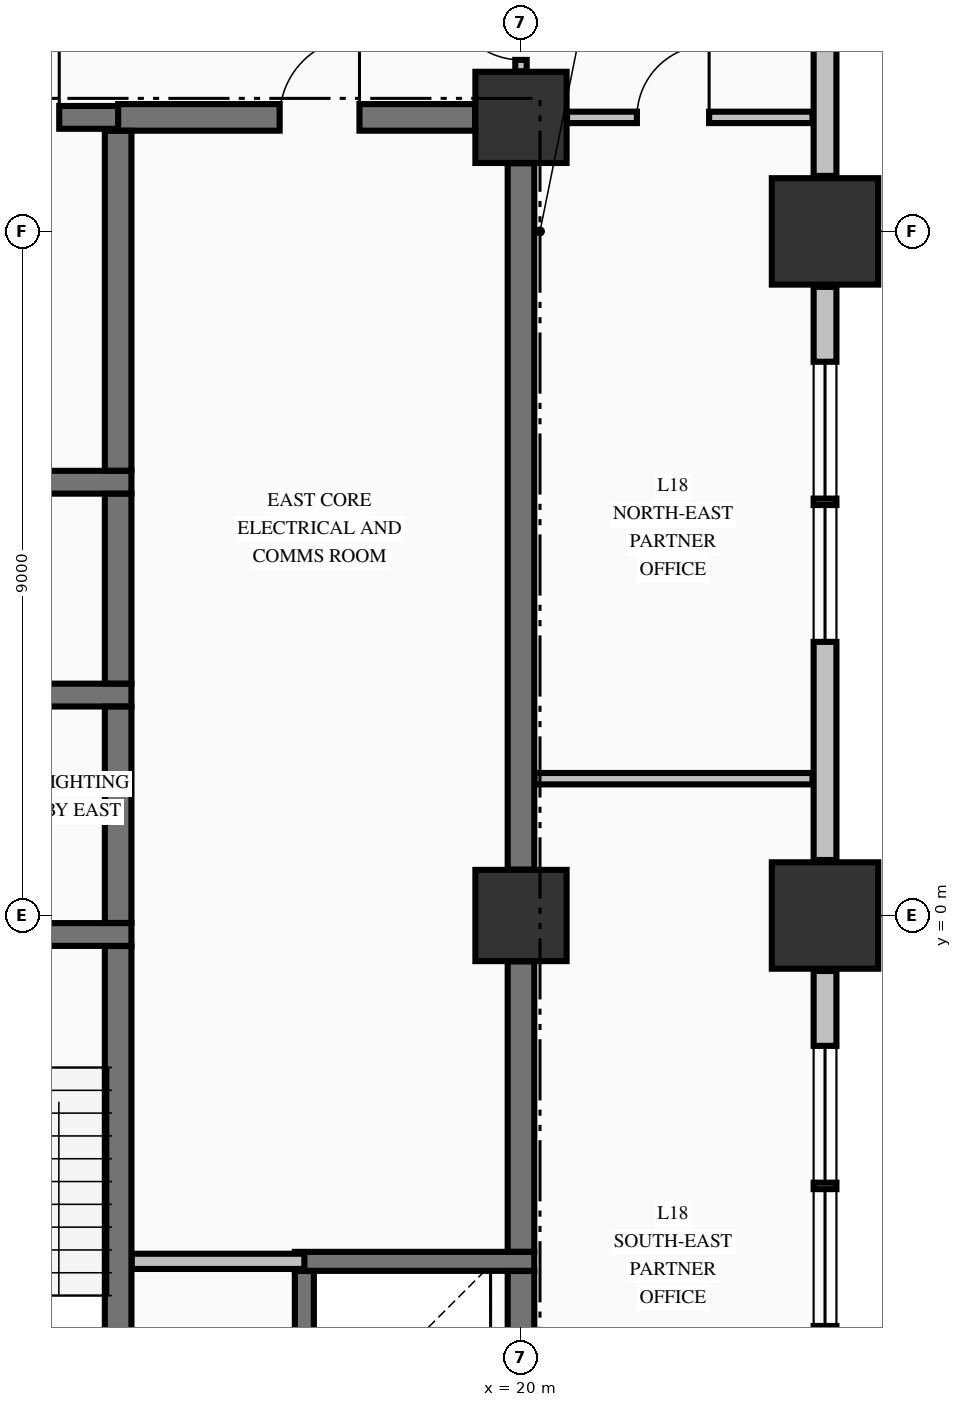
"""IFC4 building model, lengths in metres.
Left out: names, types, materials, properties, quantities, classifications, styles, units other than length and angle.
Written with IfcOpenShell. Run it as: python <this file> out.ifc"""

import sys

from ifc_helpers import new_model, si_unit, direction, frame, frame_2d, origin, origin_2d, place, context, subcontext, project, spatial, rectangle, extrude, element, fill, save


model = new_model("IFC4")
c1 = context("Model", 3, precision=1e-05, world=origin(), true_north=direction((0.0, 1.0)))
c2 = subcontext(c1, "Body", "Model", "MODEL_VIEW")
j1 = project(units=[si_unit("LENGTHUNIT", "METRE"), si_unit("PLANEANGLEUNIT", "RADIAN")], contexts=[c1])
p1 = place(None, origin())
s1 = spatial("IfcSite", under=j1, at=p1, CompositionType="ELEMENT")
p2 = place(p1, origin())
s2 = spatial("IfcBuilding", under=s1, at=p2, CompositionType="ELEMENT")
p3 = place(p2, frame((0.0, 0.0, 75.04)))
s3 = spatial("IfcBuildingStorey", under=s2, at=p3, CompositionType="ELEMENT", Elevation=75.04)
for number, where, z_axis, x_axis in (
    (1, (24.0, 0.0, -0.25), (0.0, 0.0, 1.0), (1.0, 0.0, 0.0)),
    (2, (24.0, 9.0, -0.25), (0.0, 0.0, 1.0), (1.0, 0.0, 0.0)),
):
    element("IfcColumn", number, at=place(p3, frame(where, z_axis=z_axis, x_axis=x_axis)), inside=s3, PredefinedType="COLUMN", context=c2, shape_type="SweptSolid", body=[
        extrude(rectangle(XDim=1.4, YDim=1.4, at=origin_2d()), origin(), (0.0, 0.0, 1.0), 3.57),
    ])
for number, where, z_axis, x_axis in (
    (3, (20.0, 10.5, -0.25), (0.0, 0.0, 1.0), (1.0, 0.0, 0.0)),
    (4, (20.0, 0.0, -0.25), (0.0, 0.0, 1.0), (1.0, 0.0, 0.0)),
):
    element("IfcColumn", number, at=place(p3, frame(where, z_axis=z_axis, x_axis=x_axis)), inside=s3, PredefinedType="COLUMN", context=c2, shape_type="SweptSolid", body=[
        extrude(rectangle(XDim=1.2, YDim=1.2, at=origin_2d()), origin(), (0.0, 0.0, 1.0), 3.57),
    ])
p4 = place(p3, frame((24.0, -8.27, 0.0), z_axis=(0.0, 0.0, 1.0), x_axis=(0.0, 1.0, 0.0)))
e5 = element("IfcWall", 5, at=p4, inside=s3, PredefinedType="STANDARD", context=c2, shape_type="SweptSolid", body=[
    extrude(rectangle(XDim=7.54, YDim=0.3, at=frame_2d((3.77, 0.0))), origin(), (0.0, 0.0, 1.0), 2.712),
])
p5 = place(p4, frame((0.985, 0.0, 0.78)))
e6 = element("IfcOpeningElement", 6, at=p5, cuts=e5, PredefinedType="OPENING", context=c2, shape_type="SweptSolid", body=[
    extrude(rectangle(XDim=1.8, YDim=1.72, at=frame_2d((0.9, 0.86))), frame((0.0, 0.16, 0.0), z_axis=(0.0, -1.0, 0.0), x_axis=(1.0, 0.0, 0.0)), (0.0, 0.0, 1.0), 0.32),
])
p6 = place(p4, frame((2.87, 0.0, 0.78)))
e7 = element("IfcOpeningElement", 7, at=p6, cuts=e5, PredefinedType="OPENING", context=c2, shape_type="SweptSolid", body=[
    extrude(rectangle(XDim=1.8, YDim=1.72, at=frame_2d((0.9, 0.86))), frame((0.0, 0.16, 0.0), z_axis=(0.0, -1.0, 0.0), x_axis=(1.0, 0.0, 0.0)), (0.0, 0.0, 1.0), 0.32),
])
p7 = place(p4, frame((4.755, 0.0, 0.78)))
e8 = element("IfcOpeningElement", 8, at=p7, cuts=e5, PredefinedType="OPENING", context=c2, shape_type="SweptSolid", body=[
    extrude(rectangle(XDim=1.8, YDim=1.72, at=frame_2d((0.9, 0.86))), frame((0.0, 0.16, 0.0), z_axis=(0.0, -1.0, 0.0), x_axis=(1.0, 0.0, 0.0)), (0.0, 0.0, 1.0), 0.32),
])
p8 = place(p3, frame((24.0, 0.73, 0.0), z_axis=(0.0, 0.0, 1.0), x_axis=(0.0, 1.0, 0.0)))
e9 = element("IfcWall", 9, at=p8, inside=s3, PredefinedType="STANDARD", context=c2, shape_type="SweptSolid", body=[
    extrude(rectangle(XDim=7.54, YDim=0.3, at=frame_2d((3.77, 0.0))), origin(), (0.0, 0.0, 1.0), 2.712),
])
p9 = place(p8, frame((2.87, 0.0, 0.78)))
e10 = element("IfcOpeningElement", 10, at=p9, cuts=e9, PredefinedType="OPENING", context=c2, shape_type="SweptSolid", body=[
    extrude(rectangle(XDim=1.8, YDim=1.72, at=frame_2d((0.9, 0.86))), frame((0.0, 0.16, 0.0), z_axis=(0.0, -1.0, 0.0), x_axis=(1.0, 0.0, 0.0)), (0.0, 0.0, 1.0), 0.32),
])
p10 = place(p8, frame((4.755, 0.0, 0.78)))
e11 = element("IfcOpeningElement", 11, at=p10, cuts=e9, PredefinedType="OPENING", context=c2, shape_type="SweptSolid", body=[
    extrude(rectangle(XDim=1.8, YDim=1.72, at=frame_2d((0.9, 0.86))), frame((0.0, 0.16, 0.0), z_axis=(0.0, -1.0, 0.0), x_axis=(1.0, 0.0, 0.0)), (0.0, 0.0, 1.0), 0.32),
])
p11 = place(p3, frame((24.0, 9.73, 0.0), z_axis=(0.0, 0.0, 1.0), x_axis=(0.0, 1.0, 0.0)))
e12 = element("IfcWall", 12, at=p11, inside=s3, PredefinedType="STANDARD", context=c2, shape_type="SweptSolid", body=[
    extrude(rectangle(XDim=12.54, YDim=0.3, at=frame_2d((6.27, 0.0))), origin(), (0.0, 0.0, 1.0), 2.712),
])
p12 = place(p3, frame((17.025, -4.55, 0.0), z_axis=(0.0, 0.0, 1.0), x_axis=(1.0, 0.0, 0.0)))
e13 = element("IfcWall", 13, at=p12, inside=s3, PredefinedType="SOLIDWALL", context=c2, shape_type="SweptSolid", body=[
    extrude(rectangle(XDim=3.15, YDim=0.25, at=frame_2d((1.575, 0.0))), origin(), (0.0, 0.0, 1.0), 3.32),
])
p13 = place(p3, frame((11.604, -0.25, 0.0), z_axis=(0.0, 0.0, 1.0), x_axis=(1.0, 0.0, 0.0)))
e14 = element("IfcWall", 14, at=p13, inside=s3, PredefinedType="SHEAR", context=c2, shape_type="SweptSolid", body=[
    extrude(rectangle(XDim=3.271, YDim=0.3, at=frame_2d((1.635, 0.0))), origin(), (0.0, 0.0, 1.0), 3.32),
])
p14 = place(p13, frame((0.996, 0.0, 0.0)))
e15 = element("IfcOpeningElement", 15, at=p14, cuts=e14, PredefinedType="OPENING", context=c2, shape_type="SweptSolid", body=[
    extrude(rectangle(XDim=1.1, YDim=2.15, at=frame_2d((0.55, 1.075))), frame((0.0, 0.16, 0.0), z_axis=(0.0, -1.0, 0.0), x_axis=(1.0, 0.0, 0.0)), (0.0, 0.0, 1.0), 0.32),
])
p15 = place(p3, frame((10.85, 2.9, 0.0), z_axis=(0.0, 0.0, 1.0), x_axis=(1.0, 0.0, 0.0)))
e16 = element("IfcWall", 16, at=p15, inside=s3, PredefinedType="SHEAR", context=c2, shape_type="SweptSolid", body=[
    extrude(rectangle(XDim=4.025, YDim=0.3, at=frame_2d((2.012, 0.0))), origin(), (0.0, 0.0, 1.0), 3.32),
])
p16 = place(p15, frame((0.85, 0.0, 0.0)))
e17 = element("IfcOpeningElement", 17, at=p16, cuts=e16, PredefinedType="OPENING", context=c2, shape_type="SweptSolid", body=[
    extrude(rectangle(XDim=1.1, YDim=2.2, at=frame_2d((0.55, 1.1))), frame((0.0, 0.16, 0.0), z_axis=(0.0, -1.0, 0.0), x_axis=(1.0, 0.0, 0.0)), (0.0, 0.0, 1.0), 0.32),
])
p17 = place(p3, frame((10.85, 5.7, 0.0), z_axis=(0.0, 0.0, 1.0), x_axis=(1.0, 0.0, 0.0)))
e18 = element("IfcWall", 18, at=p17, inside=s3, PredefinedType="SHEAR", context=c2, shape_type="SweptSolid", body=[
    extrude(rectangle(XDim=4.025, YDim=0.3, at=frame_2d((2.012, 0.0))), origin(), (0.0, 0.0, 1.0), 3.32),
])
p18 = place(p3, frame((11.604, 10.5, 0.0), z_axis=(0.0, 0.0, 1.0), x_axis=(1.0, 0.0, 0.0)))
e19 = element("IfcWall", 19, at=p18, inside=s3, PredefinedType="SHEAR", context=c2, shape_type="SweptSolid", body=[
    extrude(rectangle(XDim=3.096, YDim=0.3, at=frame_2d((1.548, 0.0))), origin(), (0.0, 0.0, 1.0), 3.32),
])
p19 = place(p18, frame((1.371, 0.0, 0.0)))
e20 = element("IfcOpeningElement", 20, at=p19, cuts=e19, PredefinedType="OPENING", context=c2, shape_type="SweptSolid", body=[
    extrude(rectangle(XDim=0.95, YDim=2.15, at=frame_2d((0.475, 1.075))), frame((0.0, 0.16, 0.0), z_axis=(0.0, -1.0, 0.0), x_axis=(1.0, 0.0, 0.0)), (0.0, 0.0, 1.0), 0.32),
])
p20 = place(p3, frame((14.7, 10.5, 0.0), z_axis=(0.0, 0.0, 1.0), x_axis=(1.0, 0.0, 0.0)))
e21 = element("IfcWall", 21, at=p20, inside=s3, PredefinedType="SHEAR", context=c2, shape_type="SweptSolid", body=[
    extrude(rectangle(XDim=4.696, YDim=0.35, at=frame_2d((2.348, 0.0))), origin(), (0.0, 0.0, 1.0), 3.32),
])
p21 = place(p20, frame((2.125, 0.0, 0.0)))
e22 = element("IfcOpeningElement", 22, at=p21, cuts=e21, PredefinedType="OPENING", context=c2, shape_type="SweptSolid", body=[
    extrude(rectangle(XDim=1.05, YDim=2.15, at=frame_2d((0.525, 1.075))), frame((0.0, 0.185, 0.0), z_axis=(0.0, -1.0, 0.0), x_axis=(1.0, 0.0, 0.0)), (0.0, 0.0, 1.0), 0.37),
])
p22 = place(p3, frame((14.878, -4.55, 0.0), z_axis=(0.0, 0.0, 1.0), x_axis=(1.0, 0.0, 0.0)))
e23 = element("IfcWall", 23, at=p22, inside=s3, PredefinedType="PARTITIONING", context=c2, shape_type="SweptSolid", body=[
    extrude(rectangle(XDim=2.272, YDim=0.2, at=frame_2d((1.136, 0.0))), origin(), (0.0, 0.0, 1.0), 3.32),
])
p23 = place(p3, frame((20.178, 1.8, 0.0), z_axis=(0.0, 0.0, 1.0), x_axis=(1.0, 0.0, 0.0)))
e24 = element("IfcWall", 24, at=p23, inside=s3, PredefinedType="PARTITIONING", context=c2, shape_type="SweptSolid", body=[
    extrude(rectangle(XDim=3.657, YDim=0.15, at=frame_2d((1.829, 0.0))), origin(), (0.0, 0.0, 1.0), 3.32),
])
p24 = place(p3, frame((20.606, 10.5, 0.0), z_axis=(0.0, 0.0, 1.0), x_axis=(1.0, 0.0, 0.0)))
e25 = element("IfcWall", 25, at=p24, inside=s3, PredefinedType="PARTITIONING", context=c2, shape_type="SweptSolid", body=[
    extrude(rectangle(XDim=3.229, YDim=0.15, at=frame_2d((1.615, 0.0))), origin(), (0.0, 0.0, 1.0), 3.32),
])
p25 = place(p24, frame((0.919, 0.0, 0.0)))
e26 = element("IfcOpeningElement", 26, at=p25, cuts=e25, PredefinedType="OPENING", context=c2, shape_type="SweptSolid", body=[
    extrude(rectangle(XDim=0.95, YDim=2.15, at=frame_2d((0.475, 1.075))), frame((0.0, 0.085, 0.0), z_axis=(0.0, -1.0, 0.0), x_axis=(1.0, 0.0, 0.0)), (0.0, 0.0, 1.0), 0.17),
])
p26 = place(p3, frame((14.7, -9.773, 0.0), z_axis=(0.0, 0.0, 1.0), x_axis=(0.0, 1.0, 0.0)))
e27 = element("IfcWall", 27, at=p26, inside=s3, PredefinedType="SHEAR", context=c2, shape_type="SweptSolid", body=[
    extrude(rectangle(XDim=9.371, YDim=0.35, at=frame_2d((4.686, 0.0))), origin(), (0.0, 0.0, 1.0), 3.32),
])
p27 = place(p3, frame((14.7, -0.098, 0.0), z_axis=(0.0, 0.0, 1.0), x_axis=(0.0, 1.0, 0.0)))
e28 = element("IfcWall", 28, at=p27, inside=s3, PredefinedType="SHEAR", context=c2, shape_type="SweptSolid", body=[
    extrude(rectangle(XDim=2.846, YDim=0.35, at=frame_2d((1.423, 0.0))), origin(), (0.0, 0.0, 1.0), 3.32),
])
p28 = place(p3, frame((14.7, 3.052, 0.0), z_axis=(0.0, 0.0, 1.0), x_axis=(0.0, 1.0, 0.0)))
e29 = element("IfcWall", 29, at=p28, inside=s3, PredefinedType="SHEAR", context=c2, shape_type="SweptSolid", body=[
    extrude(rectangle(XDim=2.496, YDim=0.35, at=frame_2d((1.248, 0.0))), origin(), (0.0, 0.0, 1.0), 3.32),
])
p29 = place(p3, frame((14.7, 5.852, 0.0), z_axis=(0.0, 0.0, 1.0), x_axis=(0.0, 1.0, 0.0)))
e30 = element("IfcWall", 30, at=p29, inside=s3, PredefinedType="SHEAR", context=c2, shape_type="SweptSolid", body=[
    extrude(rectangle(XDim=4.471, YDim=0.35, at=frame_2d((2.235, 0.0))), origin(), (0.0, 0.0, 1.0), 3.32),
])
p30 = place(p3, frame((17.15, -6.923, 0.0), z_axis=(0.0, 0.0, 1.0), x_axis=(0.0, 1.0, 0.0)))
e31 = element("IfcWall", 31, at=p30, inside=s3, PredefinedType="SOLIDWALL", context=c2, shape_type="SweptSolid", body=[
    extrude(rectangle(XDim=2.246, YDim=0.25, at=frame_2d((1.123, 0.0))), origin(), (0.0, 0.0, 1.0), 3.32),
])
p31 = place(p3, frame((20.0, -6.923, 0.0), z_axis=(0.0, 0.0, 1.0), x_axis=(0.0, 1.0, 0.0)))
e32 = element("IfcWall", 32, at=p31, inside=s3, PredefinedType="SHEAR", context=c2, shape_type="SweptSolid", body=[
    extrude(rectangle(XDim=2.246, YDim=0.35, at=frame_2d((1.123, 0.0))), origin(), (0.0, 0.0, 1.0), 3.32),
])
p32 = place(p3, frame((20.0, -4.423, 0.0), z_axis=(0.0, 0.0, 1.0), x_axis=(0.0, 1.0, 0.0)))
e33 = element("IfcWall", 33, at=p32, inside=s3, PredefinedType="SHEAR", context=c2, shape_type="SweptSolid", body=[
    extrude(rectangle(XDim=3.819, YDim=0.35, at=frame_2d((1.91, 0.0))), origin(), (0.0, 0.0, 1.0), 3.32),
])
p33 = place(p3, frame((20.0, 0.604, 0.0), z_axis=(0.0, 0.0, 1.0), x_axis=(0.0, 1.0, 0.0)))
e34 = element("IfcWall", 34, at=p33, inside=s3, PredefinedType="SHEAR", context=c2, shape_type="SweptSolid", body=[
    extrude(rectangle(XDim=9.292, YDim=0.35, at=frame_2d((4.646, 0.0))), origin(), (0.0, 0.0, 1.0), 3.32),
])
p34 = place(p3, frame((20.0, 11.106, 0.0), z_axis=(0.0, 0.0, 1.0), x_axis=(0.0, 1.0, 0.0)))
e35 = element("IfcWall", 35, at=p34, inside=s3, PredefinedType="PARTITIONING", context=c2, shape_type="SweptSolid", body=[
    extrude(rectangle(XDim=1.366, YDim=0.15, at=frame_2d((0.683, 0.0))), origin(), (0.0, 0.0, 1.0), 3.32),
])
p35 = place(p34, frame((0.15, 0.0, 0.0)))
e36 = element("IfcOpeningElement", 36, at=p35, cuts=e35, PredefinedType="OPENING", context=c2, shape_type="SweptSolid", body=[
    extrude(rectangle(XDim=0.95, YDim=2.15, at=frame_2d((0.475, 1.075))), frame((0.0, 0.085, 0.0), z_axis=(0.0, -1.0, 0.0), x_axis=(1.0, 0.0, 0.0)), (0.0, 0.0, 1.0), 0.17),
])
p36 = place(p6, origin())
e37 = element("IfcWindow", 37, at=p36, inside=s3, PartitioningType="SINGLE_PANEL", PredefinedType="WINDOW", context=c2, shape_type="SweptSolid", body=[
    extrude(rectangle(XDim=1.8, YDim=1.72, at=frame_2d((0.9, 0.86))), frame((0.0, 0.03, 0.0), z_axis=(0.0, -1.0, 0.0), x_axis=(1.0, 0.0, 0.0)), (0.0, 0.0, 1.0), 0.06),
])
fill(e7, e37)
p37 = place(p7, origin())
e38 = element("IfcWindow", 38, at=p37, inside=s3, PartitioningType="SINGLE_PANEL", PredefinedType="WINDOW", context=c2, shape_type="SweptSolid", body=[
    extrude(rectangle(XDim=1.8, YDim=1.72, at=frame_2d((0.9, 0.86))), frame((0.0, 0.03, 0.0), z_axis=(0.0, -1.0, 0.0), x_axis=(1.0, 0.0, 0.0)), (0.0, 0.0, 1.0), 0.06),
])
fill(e8, e38)
p38 = place(p9, origin())
e39 = element("IfcWindow", 39, at=p38, inside=s3, PartitioningType="SINGLE_PANEL", PredefinedType="WINDOW", context=c2, shape_type="SweptSolid", body=[
    extrude(rectangle(XDim=1.8, YDim=1.72, at=frame_2d((0.9, 0.86))), frame((0.0, 0.03, 0.0), z_axis=(0.0, -1.0, 0.0), x_axis=(1.0, 0.0, 0.0)), (0.0, 0.0, 1.0), 0.06),
])
fill(e10, e39)
p39 = place(p10, origin())
e40 = element("IfcWindow", 40, at=p39, inside=s3, PartitioningType="SINGLE_PANEL", PredefinedType="WINDOW", context=c2, shape_type="SweptSolid", body=[
    extrude(rectangle(XDim=1.8, YDim=1.72, at=frame_2d((0.9, 0.86))), frame((0.0, 0.03, 0.0), z_axis=(0.0, -1.0, 0.0), x_axis=(1.0, 0.0, 0.0)), (0.0, 0.0, 1.0), 0.06),
])
fill(e11, e40)
p40 = place(p19, origin())
e41 = element("IfcDoor", 41, at=p40, inside=s3, OperationType="SINGLE_SWING_RIGHT", PredefinedType="DOOR", context=c2, shape_type="SweptSolid", body=[
    extrude(rectangle(XDim=0.95, YDim=2.15, at=frame_2d((0.475, 1.075))), frame((0.0, 0.025, 0.0), z_axis=(0.0, -1.0, 0.0), x_axis=(1.0, 0.0, 0.0)), (0.0, 0.0, 1.0), 0.05),
])
fill(e20, e41)
p41 = place(p21, origin())
e42 = element("IfcDoor", 42, at=p41, inside=s3, OperationType="SINGLE_SWING_RIGHT", PredefinedType="DOOR", context=c2, shape_type="SweptSolid", body=[
    extrude(rectangle(XDim=1.05, YDim=2.15, at=frame_2d((0.525, 1.075))), frame((0.0, 0.025, 0.0), z_axis=(0.0, -1.0, 0.0), x_axis=(1.0, 0.0, 0.0)), (0.0, 0.0, 1.0), 0.05),
])
fill(e22, e42)
p42 = place(p35, origin())
e43 = element("IfcDoor", 43, at=p42, inside=s3, OperationType="SINGLE_SWING_RIGHT", PredefinedType="DOOR", context=c2, shape_type="SweptSolid", body=[
    extrude(rectangle(XDim=0.95, YDim=2.15, at=frame_2d((0.475, 1.075))), frame((0.0, 0.025, 0.0), z_axis=(0.0, -1.0, 0.0), x_axis=(1.0, 0.0, 0.0)), (0.0, 0.0, 1.0), 0.05),
])
fill(e36, e43)
p43 = place(p25, origin())
e44 = element("IfcDoor", 44, at=p43, inside=s3, OperationType="SINGLE_SWING_RIGHT", PredefinedType="DOOR", context=c2, shape_type="SweptSolid", body=[
    extrude(rectangle(XDim=0.95, YDim=2.15, at=frame_2d((0.475, 1.075))), frame((0.0, 0.025, 0.0), z_axis=(0.0, -1.0, 0.0), x_axis=(1.0, 0.0, 0.0)), (0.0, 0.0, 1.0), 0.05),
])
fill(e26, e44)
save(model, sys.argv[1])
